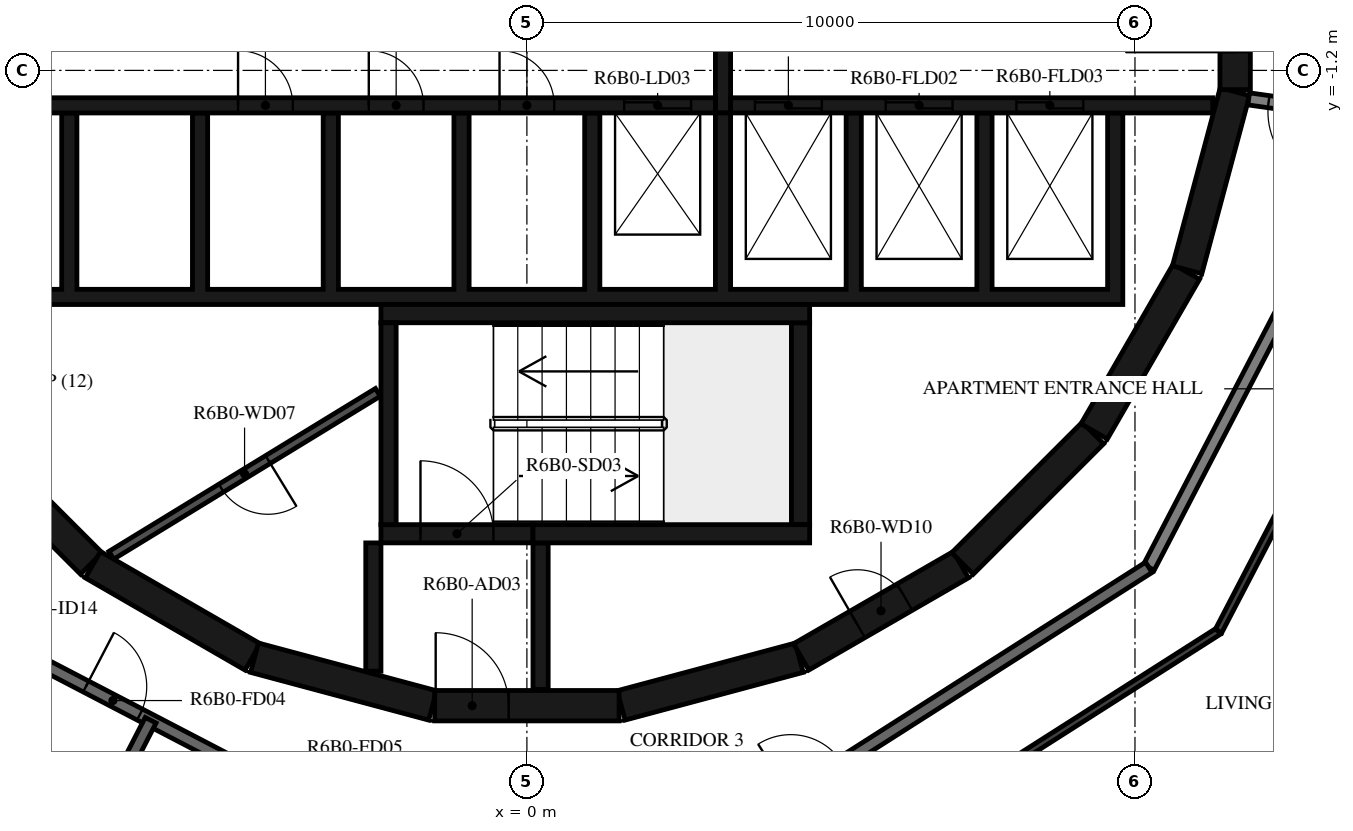
"""IFC4 building model, lengths in metres.
Left out: names, types, materials, properties, quantities, classifications, styles, units other than length and angle.
Written with IfcOpenShell. Run it as: python <this file> out.ifc"""

import sys

from ifc_helpers import new_model, si_unit, direction, frame, frame_2d, origin, place, context, subcontext, project, spatial, polyline, rectangle, outline, extrude, element, fill, save


model = new_model("IFC4")
c1 = context("Model", 3, precision=1e-05, world=origin(), true_north=direction((0.0, 1.0)))
c2 = subcontext(c1, "Body", "Model", "MODEL_VIEW")
j1 = project(units=[si_unit("LENGTHUNIT", "METRE"), si_unit("PLANEANGLEUNIT", "RADIAN")], contexts=[c1])
p1 = place(None, origin())
s1 = spatial("IfcSite", under=j1, at=p1, CompositionType="ELEMENT")
p2 = place(p1, origin())
s2 = spatial("IfcBuilding", under=s1, at=p2, CompositionType="ELEMENT")
p3 = place(p2, frame((0.0, 0.0, 240.7)))
s3 = spatial("IfcBuildingStorey", under=s2, at=p3, CompositionType="ELEMENT", Elevation=240.7)
p4 = place(p3, frame((1.55, -11.643, 0.0), z_axis=(0.0, 0.0, 1.0), x_axis=(0.965948410781, 0.258734743916, 0.0)))
e1 = element("IfcWall", 1, at=p4, inside=s3, PredefinedType="SHEAR", context=c2, shape_type="SweptSolid", body=[
    extrude(rectangle(XDim=3.033, YDim=0.5, at=frame_2d((1.516, 0.0))), origin(), (0.0, 0.0, 1.0), 3.12),
])
p5 = place(p3, frame((4.51, -10.845, 0.0), z_axis=(0.0, 0.0, 1.0), x_axis=(0.865975092491, 0.500087131594, 0.0)))
e2 = element("IfcWall", 2, at=p5, inside=s3, PredefinedType="SHEAR", context=c2, shape_type="SweptSolid", body=[
    extrude(rectangle(XDim=3.033, YDim=0.5, at=frame_2d((1.516, 0.0))), origin(), (0.0, 0.0, 1.0), 3.12),
])
p6 = place(p5, frame((1.066, 0.0, 0.0)))
e3 = element("IfcOpeningElement", 3, at=p6, cuts=e2, PredefinedType="OPENING", context=c2, shape_type="SweptSolid", body=[
    extrude(rectangle(XDim=0.9, YDim=2.1, at=frame_2d((0.45, 1.05))), frame((0.0, 0.26, 0.0), z_axis=(0.0, -1.0, 0.0), x_axis=(1.0, 0.0, 0.0)), (0.0, 0.0, 1.0), 0.52),
])
p7 = place(p3, frame((7.164, -9.308, 0.0), z_axis=(0.0, 0.0, 1.0), x_axis=(0.707106781187, 0.707106781187, 0.0)))
e4 = element("IfcWall", 4, at=p7, inside=s3, PredefinedType="SHEAR", context=c2, shape_type="SweptSolid", body=[
    extrude(rectangle(XDim=3.032, YDim=0.5, at=frame_2d((1.516, 0.0))), origin(), (0.0, 0.0, 1.0), 3.12),
])
for number, where, z_axis, x_axis in (
    (5, (9.329, -7.137, 0.0), (0.0, 0.0, 1.0), (0.5, 0.866, 0.0)),
    (6, (10.858, -4.479, 0.0), (0.0, 0.0, 1.0), (0.259, 0.966, 0.0)),
):
    element("IfcWall", number, at=place(p3, frame(where, z_axis=z_axis, x_axis=x_axis)), inside=s3, PredefinedType="SHEAR", context=c2, shape_type="SweptSolid", body=[
        extrude(rectangle(XDim=3.033, YDim=0.5, at=frame_2d((1.516, 0.0))), origin(), (0.0, 0.0, 1.0), 3.12),
    ])
p8 = place(p3, frame((11.647, -1.516, 0.0), z_axis=(0.0, 0.0, 1.0), x_axis=(0.0, 1.0, 0.0)))
e7 = element("IfcWall", 7, at=p8, inside=s3, PredefinedType="SHEAR", context=c2, shape_type="SweptSolid", body=[
    extrude(rectangle(XDim=3.033, YDim=0.5, at=frame_2d((1.516, 0.0))), origin(), (0.0, 0.0, 1.0), 3.12),
])
p9 = place(p8, frame((0.616, 0.0, 0.0)))
e8 = element("IfcOpeningElement", 8, at=p9, cuts=e7, PredefinedType="OPENING", context=c2, shape_type="SweptSolid", body=[
    extrude(rectangle(XDim=1.8, YDim=2.1, at=frame_2d((0.9, 1.05))), frame((0.0, 0.26, 0.0), z_axis=(0.0, -1.0, 0.0), x_axis=(1.0, 0.0, 0.0)), (0.0, 0.0, 1.0), 0.52),
])
p10 = place(p3, frame((-9.308, -7.164, 0.0), z_axis=(0.0, 0.0, 1.0), x_axis=(0.707106781187, -0.707106781187, 0.0)))
e9 = element("IfcWall", 9, at=p10, inside=s3, PredefinedType="SHEAR", context=c2, shape_type="SweptSolid", body=[
    extrude(rectangle(XDim=3.032, YDim=0.5, at=frame_2d((1.516, 0.0))), origin(), (0.0, 0.0, 1.0), 3.12),
])
for number, where, z_axis, x_axis in (
    (10, (-7.137, -9.329, 0.0), (0.0, 0.0, 1.0), (0.866, -0.5, 0.0)),
    (11, (-4.479, -10.858, 0.0), (0.0, 0.0, 1.0), (0.966, -0.259, 0.0)),
):
    element("IfcWall", number, at=place(p3, frame(where, z_axis=z_axis, x_axis=x_axis)), inside=s3, PredefinedType="SHEAR", context=c2, shape_type="SweptSolid", body=[
        extrude(rectangle(XDim=3.033, YDim=0.5, at=frame_2d((1.516, 0.0))), origin(), (0.0, 0.0, 1.0), 3.12),
    ])
p11 = place(p3, frame((-1.516, -11.647, 0.0), z_axis=(0.0, 0.0, 1.0), x_axis=(1.0, 0.0, 0.0)))
e12 = element("IfcWall", 12, at=p11, inside=s3, PredefinedType="SHEAR", context=c2, shape_type="SweptSolid", body=[
    extrude(rectangle(XDim=3.033, YDim=0.5, at=frame_2d((1.516, 0.0))), origin(), (0.0, 0.0, 1.0), 3.12),
])
p12 = place(p11, frame((0.016, 0.0, 0.0)))
e13 = element("IfcOpeningElement", 13, at=p12, cuts=e12, PredefinedType="OPENING", context=c2, shape_type="SweptSolid", body=[
    extrude(rectangle(XDim=1.2, YDim=2.1, at=frame_2d((0.6, 1.05))), frame((0.0, 0.26, 0.0), z_axis=(0.0, -1.0, 0.0), x_axis=(1.0, 0.0, 0.0)), (0.0, 0.0, 1.0), 0.52),
])
p13 = place(p3, frame((-2.275, -8.67, 0.0), z_axis=(0.0, 0.0, 1.0), x_axis=(0.0, 1.0, 0.0)))
e14 = element("IfcWall", 14, at=p13, inside=s3, PredefinedType="SHEAR", context=c2, shape_type="SweptSolid", body=[
    extrude(rectangle(XDim=3.32, YDim=0.25, at=frame_2d((1.66, 0.0))), origin(), (0.0, 0.0, 1.0), 3.12),
])
p14 = place(p3, frame((-2.4, -5.2, 0.0), z_axis=(0.0, 0.0, 1.0), x_axis=(1.0, 0.0, 0.0)))
e15 = element("IfcWall", 15, at=p14, inside=s3, PredefinedType="SHEAR", context=c2, shape_type="SweptSolid", body=[
    extrude(rectangle(XDim=7.05, YDim=0.3, at=frame_2d((3.525, 0.0))), origin(), (0.0, 0.0, 1.0), 3.12),
])
p15 = place(p3, frame((4.5, -8.67, 0.0), z_axis=(0.0, 0.0, 1.0), x_axis=(0.0, 1.0, 0.0)))
e16 = element("IfcWall", 16, at=p15, inside=s3, PredefinedType="SHEAR", context=c2, shape_type="SweptSolid", body=[
    extrude(rectangle(XDim=3.32, YDim=0.3, at=frame_2d((1.66, 0.0))), origin(), (0.0, 0.0, 1.0), 3.12),
])
p16 = place(p3, frame((0.1, -8.82, 0.0), z_axis=(0.0, 0.0, 1.0), x_axis=(1.0, 0.0, 0.0)))
e17 = element("IfcWall", 17, at=p16, inside=s3, PredefinedType="SHEAR", context=c2, shape_type="SweptSolid", body=[
    extrude(rectangle(XDim=4.55, YDim=0.3, at=frame_2d((2.275, 0.0))), origin(), (0.0, 0.0, 1.0), 3.12),
])
p17 = place(p3, frame((-2.4, -8.82, 0.0), z_axis=(0.0, 0.0, 1.0), x_axis=(1.0, 0.0, 0.0)))
e18 = element("IfcWall", 18, at=p17, inside=s3, PredefinedType="SHEAR", context=c2, shape_type="SweptSolid", body=[
    extrude(rectangle(XDim=2.5, YDim=0.3, at=frame_2d((1.25, 0.0))), origin(), (0.0, 0.0, 1.0), 3.12),
])
p18 = place(p17, frame((0.65, 0.0, 0.0)))
e19 = element("IfcOpeningElement", 19, at=p18, cuts=e18, PredefinedType="OPENING", context=c2, shape_type="SweptSolid", body=[
    extrude(rectangle(XDim=1.2, YDim=2.1, at=frame_2d((0.6, 1.05))), frame((0.0, 0.16, 0.0), z_axis=(0.0, -1.0, 0.0), x_axis=(1.0, 0.0, 0.0)), (0.0, 0.0, 1.0), 0.32),
])
p19 = place(p3, frame((-2.525, -8.97, 0.0), z_axis=(0.0, 0.0, 1.0), x_axis=(0.0, -1.0, 0.0)))
e20 = element("IfcWall", 20, at=p19, inside=s3, PredefinedType="SHEAR", context=c2, shape_type="SweptSolid", body=[
    extrude(rectangle(XDim=2.11, YDim=0.25, at=frame_2d((1.055, 0.0))), origin(), (0.0, 0.0, 1.0), 3.12),
])
p20 = place(p3, frame((0.225, -8.97, 0.0), z_axis=(0.0, 0.0, 1.0), x_axis=(0.0, -1.0, 0.0)))
e21 = element("IfcWall", 21, at=p20, inside=s3, PredefinedType="SHEAR", context=c2, shape_type="SweptSolid", body=[
    extrude(rectangle(XDim=2.41, YDim=0.25, at=frame_2d((1.205, 0.0))), origin(), (0.0, 0.0, 1.0), 3.12),
])
p21 = place(p3, origin())
e22 = element("IfcWall", 22, at=p21, inside=s3, PredefinedType="SHEAR", context=c2, shape_type="SweptSolid", body=[
    extrude(outline(polyline([(9.8, -5.05), (9.8, -4.8), (9.8, -1.9), (9.55, -1.9), (9.55, -4.8), (7.65, -4.8), (7.65, -1.9), (7.4, -1.9), (7.4, -4.8), (5.5, -4.8), (5.5, -1.9), (5.25, -1.9), (5.25, -4.8), (3.35, -4.8), (3.35, -1.9), (3.1, -1.9), (3.1, -4.8), (1.2, -4.8), (1.2, -1.9), (0.95, -1.9), (0.95, -4.8), (-0.95, -4.8), (-0.95, -1.9), (-1.2, -1.9), (-1.2, -4.8), (-3.1, -4.8), (-3.1, -1.9), (-3.35, -1.9), (-3.35, -4.8), (-5.25, -4.8), (-5.25, -1.9), (-5.5, -1.9), (-5.5, -4.8), (-7.4, -4.8), (-7.4, -1.9), (-7.65, -1.9), (-7.65, -4.8), (-9.55, -4.8), (-9.55, -1.9), (-9.8, -1.9), (-9.8, -4.8), (-9.8, -5.05), (9.8, -5.05)])), origin(), (0.0, 0.0, 1.0), 3.12),
])
p22 = place(p3, frame((-11.28, -1.775, 0.0), z_axis=(0.0, 0.0, 1.0), x_axis=(1.0, 0.0, 0.0)))
e23 = element("IfcWall", 23, at=p22, inside=s3, PredefinedType="SHEAR", context=c2, shape_type="SweptSolid", body=[
    extrude(rectangle(XDim=14.38, YDim=0.25, at=frame_2d((7.19, 0.0))), origin(), (0.0, 0.0, 1.0), 3.12),
])
p23 = place(p22, frame((12.88, 0.0, 0.0)))
e24 = element("IfcOpeningElement", 24, at=p23, cuts=e23, PredefinedType="OPENING", context=c2, shape_type="SweptSolid", body=[
    extrude(rectangle(XDim=1.1, YDim=2.1, at=frame_2d((0.55, 1.05))), frame((0.0, 0.135, 0.0), z_axis=(0.0, -1.0, 0.0), x_axis=(1.0, 0.0, 0.0)), (0.0, 0.0, 1.0), 0.27),
])
p24 = place(p22, frame((6.53, 0.0, 0.0)))
e25 = element("IfcOpeningElement", 25, at=p24, cuts=e23, PredefinedType="OPENING", context=c2, shape_type="SweptSolid", body=[
    extrude(rectangle(XDim=0.9, YDim=2.1, at=frame_2d((0.45, 1.05))), frame((0.0, 0.135, 0.0), z_axis=(0.0, -1.0, 0.0), x_axis=(1.0, 0.0, 0.0)), (0.0, 0.0, 1.0), 0.27),
])
p25 = place(p22, frame((8.68, 0.0, 0.0)))
e26 = element("IfcOpeningElement", 26, at=p25, cuts=e23, PredefinedType="OPENING", context=c2, shape_type="SweptSolid", body=[
    extrude(rectangle(XDim=0.9, YDim=2.1, at=frame_2d((0.45, 1.05))), frame((0.0, 0.135, 0.0), z_axis=(0.0, -1.0, 0.0), x_axis=(1.0, 0.0, 0.0)), (0.0, 0.0, 1.0), 0.27),
])
p26 = place(p22, frame((10.83, 0.0, 0.0)))
e27 = element("IfcOpeningElement", 27, at=p26, cuts=e23, PredefinedType="OPENING", context=c2, shape_type="SweptSolid", body=[
    extrude(rectangle(XDim=0.9, YDim=2.1, at=frame_2d((0.45, 1.05))), frame((0.0, 0.135, 0.0), z_axis=(0.0, -1.0, 0.0), x_axis=(1.0, 0.0, 0.0)), (0.0, 0.0, 1.0), 0.27),
])
p27 = place(p3, frame((3.35, -1.775, 0.0), z_axis=(0.0, 0.0, 1.0), x_axis=(1.0, 0.0, 0.0)))
e28 = element("IfcWall", 28, at=p27, inside=s3, PredefinedType="SHEAR", context=c2, shape_type="SweptSolid", body=[
    extrude(rectangle(XDim=7.93, YDim=0.25, at=frame_2d((3.965, 0.0))), origin(), (0.0, 0.0, 1.0), 3.12),
])
p28 = place(p27, frame((0.4, 0.0, 0.0)))
e29 = element("IfcOpeningElement", 29, at=p28, cuts=e28, PredefinedType="OPENING", context=c2, shape_type="SweptSolid", body=[
    extrude(rectangle(XDim=1.1, YDim=2.4, at=frame_2d((0.55, 1.2))), frame((0.0, 0.135, 0.0), z_axis=(0.0, -1.0, 0.0), x_axis=(1.0, 0.0, 0.0)), (0.0, 0.0, 1.0), 0.27),
])
p29 = place(p27, frame((2.55, 0.0, 0.0)))
e30 = element("IfcOpeningElement", 30, at=p29, cuts=e28, PredefinedType="OPENING", context=c2, shape_type="SweptSolid", body=[
    extrude(rectangle(XDim=1.1, YDim=2.4, at=frame_2d((0.55, 1.2))), frame((0.0, 0.135, 0.0), z_axis=(0.0, -1.0, 0.0), x_axis=(1.0, 0.0, 0.0)), (0.0, 0.0, 1.0), 0.27),
])
p30 = place(p27, frame((4.7, 0.0, 0.0)))
e31 = element("IfcOpeningElement", 31, at=p30, cuts=e28, PredefinedType="OPENING", context=c2, shape_type="SweptSolid", body=[
    extrude(rectangle(XDim=1.1, YDim=2.4, at=frame_2d((0.55, 1.2))), frame((0.0, 0.135, 0.0), z_axis=(0.0, -1.0, 0.0), x_axis=(1.0, 0.0, 0.0)), (0.0, 0.0, 1.0), 0.27),
])
p31 = place(p3, frame((3.225, -1.9, 0.0), z_axis=(0.0, 0.0, 1.0), x_axis=(0.0, 1.0, 0.0)))
e32 = element("IfcWall", 32, at=p31, inside=s3, PredefinedType="SHEAR", context=c2, shape_type="SweptSolid", body=[
    extrude(rectangle(XDim=3.8, YDim=0.25, at=frame_2d((1.9, 0.0))), origin(), (0.0, 0.0, 1.0), 3.12),
])
p32 = place(p3, frame((-2.451, -6.495, 0.0), z_axis=(0.0, 0.0, 1.0), x_axis=(-0.853250115418, -0.521501908471, 0.0)))
e33 = element("IfcWall", 33, at=p32, inside=s3, PredefinedType="PARTITIONING", context=c2, shape_type="SweptSolid", body=[
    extrude(rectangle(XDim=5.137, YDim=0.15, at=frame_2d((2.569, 0.0))), origin(), (0.0, 0.0, 1.0), 3.12),
])
p33 = place(p32, frame((2.119, 0.0, 0.0)))
e34 = element("IfcOpeningElement", 34, at=p33, cuts=e33, PredefinedType="OPENING", context=c2, shape_type="SweptSolid", body=[
    extrude(rectangle(XDim=0.9, YDim=2.1, at=frame_2d((0.45, 1.05))), frame((0.0, 0.085, 0.0), z_axis=(0.0, -1.0, 0.0), x_axis=(1.0, 0.0, 0.0)), (0.0, 0.0, 1.0), 0.17),
])
p34 = place(p3, frame((10.228, -9.372, 0.0), z_axis=(0.0, 0.0, 1.0), x_axis=(0.461759464021, 0.887005184532, 0.0)))
e35 = element("IfcWall", 35, at=p34, inside=s3, PredefinedType="STANDARD", context=c2, shape_type="SweptSolid", body=[
    extrude(rectangle(XDim=7.181, YDim=0.2, at=frame_2d((3.591, 0.0))), origin(), (0.0, 0.0, 1.0), 3.12),
])
p35 = place(p3, frame((13.496, -1.897, 0.0), z_axis=(0.0, 0.0, 1.0), x_axis=(-0.99026234641, 0.139213811391, 0.0)))
e36 = element("IfcWall", 36, at=p35, inside=s3, PredefinedType="STANDARD", context=c2, shape_type="SweptSolid", body=[
    extrude(rectangle(XDim=1.641, YDim=0.2, at=frame_2d((0.821, 0.0))), origin(), (0.0, 0.0, 1.0), 3.12),
])
p36 = place(p35, frame((0.11, 0.0, 0.0)))
e37 = element("IfcOpeningElement", 37, at=p36, cuts=e36, PredefinedType="OPENING", context=c2, shape_type="SweptSolid", body=[
    extrude(rectangle(XDim=1.2, YDim=2.1, at=frame_2d((0.6, 1.05))), frame((0.0, 0.11, 0.0), z_axis=(0.0, -1.0, 0.0), x_axis=(1.0, 0.0, 0.0)), (0.0, 0.0, 1.0), 0.22),
])
p37 = place(p3, frame((-9.372, -10.228, 0.0), z_axis=(0.0, 0.0, 1.0), x_axis=(0.887005184532, -0.461759464021, 0.0)))
e38 = element("IfcWall", 38, at=p37, inside=s3, PredefinedType="STANDARD", context=c2, shape_type="SweptSolid", body=[
    extrude(rectangle(XDim=7.181, YDim=0.2, at=frame_2d((3.591, 0.0))), origin(), (0.0, 0.0, 1.0), 3.12),
])
p38 = place(p37, frame((2.391, 0.0, 0.0)))
e39 = element("IfcOpeningElement", 39, at=p38, cuts=e38, PredefinedType="OPENING", context=c2, shape_type="SweptSolid", body=[
    extrude(rectangle(XDim=1.0, YDim=2.1, at=frame_2d((0.5, 1.05))), frame((0.0, 0.11, 0.0), z_axis=(0.0, -1.0, 0.0), x_axis=(1.0, 0.0, 0.0)), (0.0, 0.0, 1.0), 0.22),
])
p39 = place(p3, frame((4.172, -13.231, 0.0), z_axis=(0.0, 0.0, 1.0), x_axis=(0.843388394728, 0.537304397561, 0.0)))
e40 = element("IfcWall", 40, at=p39, inside=s3, PredefinedType="STANDARD", context=c2, shape_type="SweptSolid", body=[
    extrude(rectangle(XDim=7.181, YDim=0.2, at=frame_2d((3.59, 0.0))), origin(), (0.0, 0.0, 1.0), 3.12),
])
p40 = place(p39, frame((0.2, 0.0, 0.0)))
e41 = element("IfcOpeningElement", 41, at=p40, cuts=e40, PredefinedType="OPENING", context=c2, shape_type="SweptSolid", body=[
    extrude(rectangle(XDim=1.0, YDim=2.1, at=frame_2d((0.5, 1.05))), frame((0.0, 0.11, 0.0), z_axis=(0.0, -1.0, 0.0), x_axis=(1.0, 0.0, 0.0)), (0.0, 0.0, 1.0), 0.22),
])
p41 = place(p3, frame((-8.303, -15.996, 0.0), z_axis=(0.0, 0.0, 1.0), x_axis=(0.457702371186, 0.889105471477, 0.0)))
e42 = element("IfcWall", 42, at=p41, inside=s3, PredefinedType="STANDARD", context=c2, shape_type="SweptSolid", body=[
    extrude(rectangle(XDim=4.623, YDim=0.2, at=frame_2d((2.312, 0.0))), origin(), (0.0, 0.0, 1.0), 3.12),
])
p42 = place(p3, frame((7.605, -12.822, 0.0), z_axis=(0.0, 0.0, 1.0), x_axis=(0.843413865585, 0.537264414733, 0.0)))
e43 = element("IfcWall", 43, at=p42, inside=s3, PredefinedType="PARTITIONING", context=c2, shape_type="SweptSolid", body=[
    extrude(rectangle(XDim=4.467, YDim=0.12, at=frame_2d((2.234, 0.0))), origin(), (0.0, 0.0, 1.0), 3.12),
])
p43 = place(p3, frame((11.373, -10.421, 0.0), z_axis=(0.0, 0.0, 1.0), x_axis=(0.461746745223, 0.887011805601, 0.0)))
e44 = element("IfcWall", 44, at=p43, inside=s3, PredefinedType="PARTITIONING", context=c2, shape_type="SweptSolid", body=[
    extrude(rectangle(XDim=7.803, YDim=0.12, at=frame_2d((3.901, 0.0))), origin(), (0.0, 0.0, 1.0), 3.12),
])
p44 = place(p43, frame((4.431, 0.0, 0.0)))
e45 = element("IfcOpeningElement", 45, at=p44, cuts=e44, PredefinedType="OPENING", context=c2, shape_type="SweptSolid", body=[
    extrude(rectangle(XDim=0.8, YDim=2.1, at=frame_2d((0.4, 1.05))), frame((0.0, 0.07, 0.0), z_axis=(0.0, -1.0, 0.0), x_axis=(1.0, 0.0, 0.0)), (0.0, 0.0, 1.0), 0.14),
])
p45 = place(p18, origin())
e46 = element("IfcDoor", 46, at=p45, inside=s3, OperationType="SINGLE_SWING_LEFT", PredefinedType="DOOR", context=c2, shape_type="SweptSolid", body=[
    extrude(rectangle(XDim=1.2, YDim=2.1, at=frame_2d((0.6, 1.05))), frame((0.0, 0.025, 0.0), z_axis=(0.0, -1.0, 0.0), x_axis=(1.0, 0.0, 0.0)), (0.0, 0.0, 1.0), 0.05),
])
fill(e19, e46)
p46 = place(p12, origin())
e47 = element("IfcDoor", 47, at=p46, inside=s3, OperationType="SINGLE_SWING_RIGHT", PredefinedType="DOOR", context=c2, shape_type="SweptSolid", body=[
    extrude(rectangle(XDim=1.2, YDim=2.1, at=frame_2d((0.6, 1.05))), frame((0.0, 0.025, 0.0), z_axis=(0.0, -1.0, 0.0), x_axis=(1.0, 0.0, 0.0)), (0.0, 0.0, 1.0), 0.05),
])
fill(e13, e47)
p47 = place(p9, origin())
e48 = element("IfcDoor", 48, at=p47, inside=s3, OperationType="DOUBLE_DOOR_SINGLE_SWING", PredefinedType="DOOR", context=c2, shape_type="SweptSolid", body=[
    extrude(rectangle(XDim=1.8, YDim=2.1, at=frame_2d((0.9, 1.05))), frame((0.0, 0.025, 0.0), z_axis=(0.0, -1.0, 0.0), x_axis=(1.0, 0.0, 0.0)), (0.0, 0.0, 1.0), 0.05),
])
fill(e8, e48)
p48 = place(p23, origin())
e49 = element("IfcDoor", 49, at=p48, inside=s3, OperationType="DOUBLE_DOOR_SLIDING", PredefinedType="DOOR", context=c2, shape_type="SweptSolid", body=[
    extrude(rectangle(XDim=1.1, YDim=2.1, at=frame_2d((0.55, 1.05))), frame((0.0, 0.025, 0.0), z_axis=(0.0, -1.0, 0.0), x_axis=(1.0, 0.0, 0.0)), (0.0, 0.0, 1.0), 0.05),
])
fill(e24, e49)
p49 = place(p28, origin())
e50 = element("IfcDoor", 50, at=p49, inside=s3, OperationType="DOUBLE_DOOR_SLIDING", PredefinedType="DOOR", context=c2, shape_type="SweptSolid", body=[
    extrude(rectangle(XDim=1.1, YDim=2.4, at=frame_2d((0.55, 1.2))), frame((0.0, 0.025, 0.0), z_axis=(0.0, -1.0, 0.0), x_axis=(1.0, 0.0, 0.0)), (0.0, 0.0, 1.0), 0.05),
])
fill(e29, e50)
p50 = place(p29, origin())
e51 = element("IfcDoor", 51, at=p50, inside=s3, OperationType="DOUBLE_DOOR_SLIDING", PredefinedType="DOOR", context=c2, shape_type="SweptSolid", body=[
    extrude(rectangle(XDim=1.1, YDim=2.4, at=frame_2d((0.55, 1.2))), frame((0.0, 0.025, 0.0), z_axis=(0.0, -1.0, 0.0), x_axis=(1.0, 0.0, 0.0)), (0.0, 0.0, 1.0), 0.05),
])
fill(e30, e51)
p51 = place(p30, origin())
e52 = element("IfcDoor", 52, at=p51, inside=s3, OperationType="DOUBLE_DOOR_SLIDING", PredefinedType="DOOR", context=c2, shape_type="SweptSolid", body=[
    extrude(rectangle(XDim=1.1, YDim=2.4, at=frame_2d((0.55, 1.2))), frame((0.0, 0.025, 0.0), z_axis=(0.0, -1.0, 0.0), x_axis=(1.0, 0.0, 0.0)), (0.0, 0.0, 1.0), 0.05),
])
fill(e31, e52)
p52 = place(p24, origin())
e53 = element("IfcDoor", 53, at=p52, inside=s3, OperationType="SINGLE_SWING_RIGHT", PredefinedType="DOOR", context=c2, shape_type="SweptSolid", body=[
    extrude(rectangle(XDim=0.9, YDim=2.1, at=frame_2d((0.45, 1.05))), frame((0.0, 0.025, 0.0), z_axis=(0.0, -1.0, 0.0), x_axis=(1.0, 0.0, 0.0)), (0.0, 0.0, 1.0), 0.05),
])
fill(e25, e53)
p53 = place(p25, origin())
e54 = element("IfcDoor", 54, at=p53, inside=s3, OperationType="SINGLE_SWING_LEFT", PredefinedType="DOOR", context=c2, shape_type="SweptSolid", body=[
    extrude(rectangle(XDim=0.9, YDim=2.1, at=frame_2d((0.45, 1.05))), frame((0.0, 0.025, 0.0), z_axis=(0.0, -1.0, 0.0), x_axis=(1.0, 0.0, 0.0)), (0.0, 0.0, 1.0), 0.05),
])
fill(e26, e54)
p54 = place(p26, origin())
e55 = element("IfcDoor", 55, at=p54, inside=s3, OperationType="SINGLE_SWING_RIGHT", PredefinedType="DOOR", context=c2, shape_type="SweptSolid", body=[
    extrude(rectangle(XDim=0.9, YDim=2.1, at=frame_2d((0.45, 1.05))), frame((0.0, 0.025, 0.0), z_axis=(0.0, -1.0, 0.0), x_axis=(1.0, 0.0, 0.0)), (0.0, 0.0, 1.0), 0.05),
])
fill(e27, e55)
p55 = place(p33, origin())
e56 = element("IfcDoor", 56, at=p55, inside=s3, OperationType="SINGLE_SWING_LEFT", PredefinedType="DOOR", context=c2, shape_type="SweptSolid", body=[
    extrude(rectangle(XDim=0.9, YDim=2.1, at=frame_2d((0.45, 1.05))), frame((0.0, 0.025, 0.0), z_axis=(0.0, -1.0, 0.0), x_axis=(1.0, 0.0, 0.0)), (0.0, 0.0, 1.0), 0.05),
])
fill(e34, e56)
p56 = place(p6, origin())
e57 = element("IfcDoor", 57, at=p56, inside=s3, OperationType="SINGLE_SWING_RIGHT", PredefinedType="DOOR", context=c2, shape_type="SweptSolid", body=[
    extrude(rectangle(XDim=0.9, YDim=2.1, at=frame_2d((0.45, 1.05))), frame((0.0, 0.025, 0.0), z_axis=(0.0, -1.0, 0.0), x_axis=(1.0, 0.0, 0.0)), (0.0, 0.0, 1.0), 0.05),
])
fill(e3, e57)
p57 = place(p38, origin())
e58 = element("IfcDoor", 58, at=p57, inside=s3, OperationType="SINGLE_SWING_RIGHT", PredefinedType="DOOR", context=c2, shape_type="SweptSolid", body=[
    extrude(rectangle(XDim=1.0, YDim=2.1, at=frame_2d((0.5, 1.05))), frame((0.0, 0.025, 0.0), z_axis=(0.0, -1.0, 0.0), x_axis=(1.0, 0.0, 0.0)), (0.0, 0.0, 1.0), 0.05),
])
fill(e39, e58)
p58 = place(p36, origin())
e59 = element("IfcDoor", 59, at=p58, inside=s3, OperationType="DOUBLE_DOOR_SINGLE_SWING", PredefinedType="DOOR", context=c2, shape_type="SweptSolid", body=[
    extrude(rectangle(XDim=1.2, YDim=2.1, at=frame_2d((0.6, 1.05))), frame((0.0, 0.025, 0.0), z_axis=(0.0, -1.0, 0.0), x_axis=(1.0, 0.0, 0.0)), (0.0, 0.0, 1.0), 0.05),
])
fill(e37, e59)
save(model, sys.argv[1])
